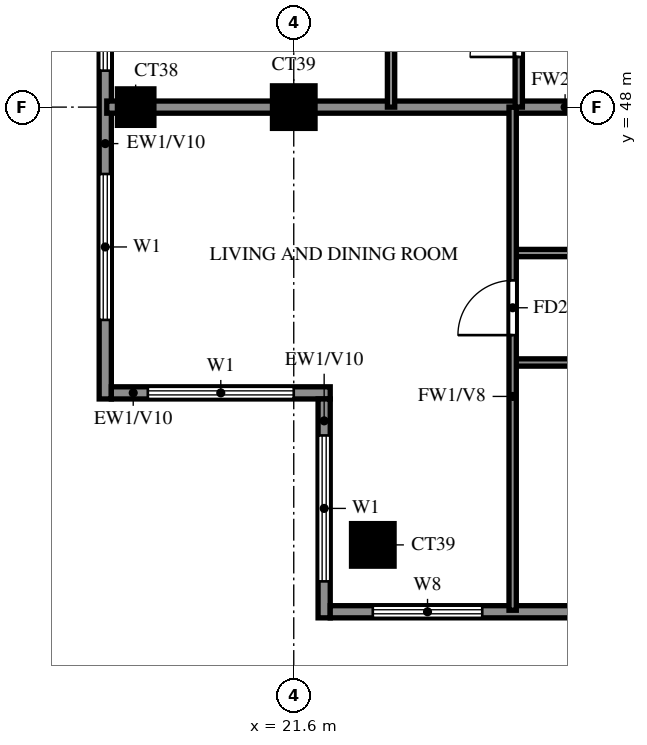
"""IFC4 building model, lengths in metres.
Left out: names, types, materials, properties, quantities, classifications, styles, units other than length and angle.
Written with IfcOpenShell. Run it as: python <this file> out.ifc"""

import sys

from ifc_helpers import new_model, si_unit, direction, frame, frame_2d, origin, origin_2d, place, context, subcontext, project, spatial, rectangle, extrude, source, transform, mapped, element, fill, save


model = new_model("IFC4")
c1 = context("Model", 3, precision=1e-05, world=origin(), true_north=direction((0.0, 1.0)))
c2 = subcontext(c1, "Body", "Model", "MODEL_VIEW")
j1 = project(units=[si_unit("LENGTHUNIT", "METRE"), si_unit("PLANEANGLEUNIT", "RADIAN")], contexts=[c1])
p1 = place(None, origin())
s1 = spatial("IfcSite", under=j1, at=p1, CompositionType="ELEMENT")
p2 = place(p1, origin())
s2 = spatial("IfcBuilding", under=s1, at=p2, CompositionType="ELEMENT")
p3 = place(p2, frame((0.0, 0.0, 267.5)))
s3 = spatial("IfcBuildingStorey", under=s2, at=p3, CompositionType="ELEMENT", Elevation=267.5)
m1 = source(origin(), c2, "Body", "SweptSolid", [
    extrude(rectangle(XDim=0.7, YDim=0.7, at=origin_2d()), origin(), (0.0, 0.0, 1.0), 3.099),
])
p4 = place(p3, frame((22.9, 40.8, 0.0), z_axis=(0.0, 0.0, 1.0), x_axis=(1.0, 0.0, 0.0)))
e1 = element("IfcColumn", 1, at=p4, inside=s3, PredefinedType="COLUMN", context=c2, shape_type="MappedRepresentation", body=[
    mapped(m1, transform((0.0, 0.0, 0.0))),
])
m2 = source(origin(), c2, "Body", "SweptSolid", [
    extrude(rectangle(XDim=0.6, YDim=0.6, at=origin_2d()), origin(), (0.0, 0.0, 1.0), 3.099),
])
p5 = place(p3, frame((19.0, 48.0, 0.0), z_axis=(0.0, 0.0, 1.0), x_axis=(1.0, 0.0, 0.0)))
e2 = element("IfcColumn", 2, at=p5, inside=s3, PredefinedType="COLUMN", context=c2, shape_type="MappedRepresentation", body=[
    mapped(m2, transform((0.0, 0.0, 0.0))),
])
p6 = place(p3, frame((21.6, 48.0, 0.0), z_axis=(0.0, 0.0, 1.0), x_axis=(1.0, 0.0, 0.0)))
e3 = element("IfcColumn", 3, at=p6, inside=s3, PredefinedType="COLUMN", context=c2, shape_type="MappedRepresentation", body=[
    mapped(m1, transform((0.0, 0.0, 0.0))),
])
p7 = place(p3, frame((18.5, 55.2, 0.0), z_axis=(0.0, 0.0, 1.0), x_axis=(0.0, -1.0, 0.0)))
e4 = element("IfcWall", 4, at=p7, inside=s3, PredefinedType="SOLIDWALL", context=c2, shape_type="SweptSolid", body=[
    extrude(rectangle(XDim=12.0, YDim=0.2, at=frame_2d((6.0, 0.0))), origin(), (0.0, 0.0, 1.0), 3.099),
])
p8 = place(p7, frame((8.3, 0.0, 0.6)))
e5 = element("IfcOpeningElement", 5, at=p8, cuts=e4, PredefinedType="OPENING", context=c2, shape_type="SweptSolid", body=[
    extrude(rectangle(XDim=2.4, YDim=2.4, at=frame_2d((1.2, 1.2))), frame((0.0, 0.11, 0.0), z_axis=(0.0, -1.0, 0.0), x_axis=(1.0, 0.0, 0.0)), (0.0, 0.0, 1.0), 0.22),
])
p9 = place(p7, frame((4.2, 0.0, 0.6)))
e6 = element("IfcOpeningElement", 6, at=p9, cuts=e4, PredefinedType="OPENING", context=c2, shape_type="SweptSolid", body=[
    extrude(rectangle(XDim=2.4, YDim=2.4, at=frame_2d((1.2, 1.2))), frame((0.0, 0.11, 0.0), z_axis=(0.0, -1.0, 0.0), x_axis=(1.0, 0.0, 0.0)), (0.0, 0.0, 1.0), 0.22),
])
p10 = place(p7, frame((0.7, 0.0, 0.6)))
e7 = element("IfcOpeningElement", 7, at=p10, cuts=e4, PredefinedType="OPENING", context=c2, shape_type="SweptSolid", body=[
    extrude(rectangle(XDim=2.4, YDim=2.4, at=frame_2d((1.2, 1.2))), frame((0.0, 0.11, 0.0), z_axis=(0.0, -1.0, 0.0), x_axis=(1.0, 0.0, 0.0)), (0.0, 0.0, 1.0), 0.22),
])
p11 = place(p3, frame((18.6, 43.3, 0.0), z_axis=(0.0, 0.0, 1.0), x_axis=(1.0, 0.0, 0.0)))
e8 = element("IfcWall", 8, at=p11, inside=s3, PredefinedType="SOLIDWALL", context=c2, shape_type="SweptSolid", body=[
    extrude(rectangle(XDim=3.6, YDim=0.2, at=frame_2d((1.8, 0.0))), origin(), (0.0, 0.0, 1.0), 3.099),
])
p12 = place(p11, frame((0.6, 0.0, 0.6)))
e9 = element("IfcOpeningElement", 9, at=p12, cuts=e8, PredefinedType="OPENING", context=c2, shape_type="SweptSolid", body=[
    extrude(rectangle(XDim=2.4, YDim=2.4, at=frame_2d((1.2, 1.2))), frame((0.0, 0.11, 0.0), z_axis=(0.0, -1.0, 0.0), x_axis=(1.0, 0.0, 0.0)), (0.0, 0.0, 1.0), 0.22),
])
p13 = place(p3, frame((22.1, 43.2, 0.0), z_axis=(0.0, 0.0, 1.0), x_axis=(0.0, -1.0, 0.0)))
e10 = element("IfcWall", 10, at=p13, inside=s3, PredefinedType="SOLIDWALL", context=c2, shape_type="SweptSolid", body=[
    extrude(rectangle(XDim=3.6, YDim=0.2, at=frame_2d((1.8, 0.0))), origin(), (0.0, 0.0, 1.0), 3.099),
])
p14 = place(p13, frame((0.6, 0.0, 0.6)))
e11 = element("IfcOpeningElement", 11, at=p14, cuts=e10, PredefinedType="OPENING", context=c2, shape_type="SweptSolid", body=[
    extrude(rectangle(XDim=2.4, YDim=2.4, at=frame_2d((1.2, 1.2))), frame((0.0, 0.11, 0.0), z_axis=(0.0, -1.0, 0.0), x_axis=(1.0, 0.0, 0.0)), (0.0, 0.0, 1.0), 0.22),
])
p15 = place(p3, frame((22.2, 39.7, 0.0), z_axis=(0.0, 0.0, 1.0), x_axis=(1.0, 0.0, 0.0)))
e12 = element("IfcWall", 12, at=p15, inside=s3, PredefinedType="SOLIDWALL", context=c2, shape_type="SweptSolid", body=[
    extrude(rectangle(XDim=19.8, YDim=0.2, at=frame_2d((9.9, 0.0))), origin(), (0.0, 0.0, 1.0), 3.099),
])
p16 = place(p15, frame((0.7, 0.0, 0.6)))
e13 = element("IfcOpeningElement", 13, at=p16, cuts=e12, PredefinedType="OPENING", context=c2, shape_type="SweptSolid", body=[
    extrude(rectangle(XDim=1.8, YDim=2.4, at=frame_2d((0.9, 1.2))), frame((0.0, 0.11, 0.0), z_axis=(0.0, -1.0, 0.0), x_axis=(1.0, 0.0, 0.0)), (0.0, 0.0, 1.0), 0.22),
])
p17 = place(p15, frame((4.35, 0.0, 1.5)))
e14 = element("IfcOpeningElement", 14, at=p17, cuts=e12, PredefinedType="OPENING", context=c2, shape_type="SweptSolid", body=[
    extrude(rectangle(XDim=0.9, YDim=0.9, at=frame_2d((0.45, 0.45))), frame((0.0, 0.11, 0.0), z_axis=(0.0, -1.0, 0.0), x_axis=(1.0, 0.0, 0.0)), (0.0, 0.0, 1.0), 0.22),
])
p18 = place(p15, frame((7.8, 0.0, 0.6)))
e15 = element("IfcOpeningElement", 15, at=p18, cuts=e12, PredefinedType="OPENING", context=c2, shape_type="SweptSolid", body=[
    extrude(rectangle(XDim=2.4, YDim=2.4, at=frame_2d((1.2, 1.2))), frame((0.0, 0.11, 0.0), z_axis=(0.0, -1.0, 0.0), x_axis=(1.0, 0.0, 0.0)), (0.0, 0.0, 1.0), 0.22),
])
p19 = place(p3, frame((18.525, 48.0, 0.0), z_axis=(0.0, 0.0, 1.0), x_axis=(1.0, 0.0, 0.0)))
e16 = element("IfcWall", 16, at=p19, inside=s3, PredefinedType="SOLIDWALL", context=c2, shape_type="SweptSolid", body=[
    extrude(rectangle(XDim=15.075, YDim=0.2, at=frame_2d((7.538, 0.0))), origin(), (0.0, 0.0, 1.0), 3.099),
])
p20 = place(p3, frame((25.2, 43.8, 0.0), z_axis=(0.0, 0.0, 1.0), x_axis=(1.0, 0.0, 0.0)))
e17 = element("IfcWall", 17, at=p20, inside=s3, PredefinedType="PARTITIONING", context=c2, shape_type="SweptSolid", body=[
    extrude(rectangle(XDim=8.4, YDim=0.12, at=frame_2d((4.2, 0.0))), origin(), (0.0, 0.0, 1.0), 3.099),
])
p21 = place(p20, frame((1.35, 0.0, 0.0)))
e18 = element("IfcOpeningElement", 18, at=p21, cuts=e17, PredefinedType="OPENING", context=c2, shape_type="SweptSolid", body=[
    extrude(rectangle(XDim=0.9, YDim=2.1, at=frame_2d((0.45, 1.05))), frame((0.0, 0.07, 0.0), z_axis=(0.0, -1.0, 0.0), x_axis=(1.0, 0.0, 0.0)), (0.0, 0.0, 1.0), 0.14),
])
p22 = place(p20, frame((5.55, 0.0, 0.0)))
e19 = element("IfcOpeningElement", 19, at=p22, cuts=e17, PredefinedType="OPENING", context=c2, shape_type="SweptSolid", body=[
    extrude(rectangle(XDim=0.9, YDim=2.1, at=frame_2d((0.45, 1.05))), frame((0.0, 0.07, 0.0), z_axis=(0.0, -1.0, 0.0), x_axis=(1.0, 0.0, 0.0)), (0.0, 0.0, 1.0), 0.14),
])
p23 = place(p3, frame((25.2, 45.6, 0.0), z_axis=(0.0, 0.0, 1.0), x_axis=(1.0, 0.0, 0.0)))
e20 = element("IfcWall", 20, at=p23, inside=s3, PredefinedType="PARTITIONING", context=c2, shape_type="SweptSolid", body=[
    extrude(rectangle(XDim=6.0, YDim=0.12, at=frame_2d((3.0, 0.0))), origin(), (0.0, 0.0, 1.0), 3.099),
])
p24 = place(p23, frame((2.55, 0.0, 0.0)))
e21 = element("IfcOpeningElement", 21, at=p24, cuts=e20, PredefinedType="OPENING", context=c2, shape_type="SweptSolid", body=[
    extrude(rectangle(XDim=0.9, YDim=2.1, at=frame_2d((0.45, 1.05))), frame((0.0, 0.07, 0.0), z_axis=(0.0, -1.0, 0.0), x_axis=(1.0, 0.0, 0.0)), (0.0, 0.0, 1.0), 0.14),
])
p25 = place(p3, frame((23.2, 48.0, 0.0), z_axis=(0.0, 0.0, 1.0), x_axis=(0.0, 1.0, 0.0)))
e22 = element("IfcWall", 22, at=p25, inside=s3, PredefinedType="PARTITIONING", context=c2, shape_type="SweptSolid", body=[
    extrude(rectangle(XDim=21.6, YDim=0.12, at=frame_2d((10.8, 0.0))), origin(), (0.0, 0.0, 1.0), 3.099),
])
p26 = place(p25, frame((1.35, 0.0, 0.0)))
e23 = element("IfcOpeningElement", 23, at=p26, cuts=e22, PredefinedType="OPENING", context=c2, shape_type="SweptSolid", body=[
    extrude(rectangle(XDim=0.9, YDim=2.1, at=frame_2d((0.45, 1.05))), frame((0.0, 0.07, 0.0), z_axis=(0.0, -1.0, 0.0), x_axis=(1.0, 0.0, 0.0)), (0.0, 0.0, 1.0), 0.14),
])
p27 = place(p25, frame((7.95, 0.0, 0.0)))
e24 = element("IfcOpeningElement", 24, at=p27, cuts=e22, PredefinedType="OPENING", context=c2, shape_type="SweptSolid", body=[
    extrude(rectangle(XDim=1.5, YDim=2.1, at=frame_2d((0.75, 1.05))), frame((0.0, 0.07, 0.0), z_axis=(0.0, -1.0, 0.0), x_axis=(1.0, 0.0, 0.0)), (0.0, 0.0, 1.0), 0.14),
])
p28 = place(p25, frame((12.15, 0.0, 0.0)))
e25 = element("IfcOpeningElement", 25, at=p28, cuts=e22, PredefinedType="OPENING", context=c2, shape_type="SweptSolid", body=[
    extrude(rectangle(XDim=0.9, YDim=2.1, at=frame_2d((0.45, 1.05))), frame((0.0, 0.07, 0.0), z_axis=(0.0, -1.0, 0.0), x_axis=(1.0, 0.0, 0.0)), (0.0, 0.0, 1.0), 0.14),
])
p29 = place(p25, frame((15.75, 0.0, 0.0)))
e26 = element("IfcOpeningElement", 26, at=p29, cuts=e22, PredefinedType="OPENING", context=c2, shape_type="SweptSolid", body=[
    extrude(rectangle(XDim=0.9, YDim=2.1, at=frame_2d((0.45, 1.05))), frame((0.0, 0.07, 0.0), z_axis=(0.0, -1.0, 0.0), x_axis=(1.0, 0.0, 0.0)), (0.0, 0.0, 1.0), 0.14),
])
p30 = place(p25, frame((19.35, 0.0, 0.0)))
e27 = element("IfcOpeningElement", 27, at=p30, cuts=e22, PredefinedType="OPENING", context=c2, shape_type="SweptSolid", body=[
    extrude(rectangle(XDim=0.9, YDim=2.1, at=frame_2d((0.45, 1.05))), frame((0.0, 0.07, 0.0), z_axis=(0.0, -1.0, 0.0), x_axis=(1.0, 0.0, 0.0)), (0.0, 0.0, 1.0), 0.14),
])
p31 = place(p3, frame((25.2, 39.725, 0.0), z_axis=(0.0, 0.0, 1.0), x_axis=(0.0, 1.0, 0.0)))
e28 = element("IfcWall", 28, at=p31, inside=s3, PredefinedType="PARTITIONING", context=c2, shape_type="SweptSolid", body=[
    extrude(rectangle(XDim=8.275, YDim=0.12, at=frame_2d((4.137, 0.0))), origin(), (0.0, 0.0, 1.0), 3.099),
])
p32 = place(p31, frame((4.525, 0.0, 0.0)))
e29 = element("IfcOpeningElement", 29, at=p32, cuts=e28, PredefinedType="OPENING", context=c2, shape_type="SweptSolid", body=[
    extrude(rectangle(XDim=0.9, YDim=2.1, at=frame_2d((0.45, 1.05))), frame((0.0, 0.07, 0.0), z_axis=(0.0, -1.0, 0.0), x_axis=(1.0, 0.0, 0.0)), (0.0, 0.0, 1.0), 0.14),
])
p33 = place(p3, frame((25.3, 48.0, 0.0), z_axis=(0.0, 0.0, 1.0), x_axis=(0.0, 1.0, 0.0)))
e30 = element("IfcWall", 30, at=p33, inside=s3, PredefinedType="PARTITIONING", context=c2, shape_type="SweptSolid", body=[
    extrude(rectangle(XDim=5.2, YDim=0.12, at=frame_2d((2.6, 0.0))), origin(), (0.0, 0.0, 1.0), 3.099),
])
p34 = place(p33, frame((0.825, 0.0, 0.0)))
e31 = element("IfcOpeningElement", 31, at=p34, cuts=e30, PredefinedType="OPENING", context=c2, shape_type="SweptSolid", body=[
    extrude(rectangle(XDim=0.8, YDim=2.1, at=frame_2d((0.4, 1.05))), frame((0.0, 0.07, 0.0), z_axis=(0.0, -1.0, 0.0), x_axis=(1.0, 0.0, 0.0)), (0.0, 0.0, 1.0), 0.14),
])
p35 = place(p8, origin())
e32 = element("IfcWindow", 32, at=p35, inside=s3, PartitioningType="DOUBLE_PANEL_VERTICAL", PredefinedType="WINDOW", context=c2, shape_type="SweptSolid", body=[
    extrude(rectangle(XDim=2.4, YDim=2.4, at=frame_2d((1.2, 1.2))), frame((0.0, 0.03, 0.0), z_axis=(0.0, -1.0, 0.0), x_axis=(1.0, 0.0, 0.0)), (0.0, 0.0, 1.0), 0.06),
])
fill(e5, e32)
p36 = place(p9, origin())
e33 = element("IfcWindow", 33, at=p36, inside=s3, PartitioningType="DOUBLE_PANEL_VERTICAL", PredefinedType="WINDOW", context=c2, shape_type="SweptSolid", body=[
    extrude(rectangle(XDim=2.4, YDim=2.4, at=frame_2d((1.2, 1.2))), frame((0.0, 0.03, 0.0), z_axis=(0.0, -1.0, 0.0), x_axis=(1.0, 0.0, 0.0)), (0.0, 0.0, 1.0), 0.06),
])
fill(e6, e33)
p37 = place(p12, origin())
e34 = element("IfcWindow", 34, at=p37, inside=s3, PartitioningType="DOUBLE_PANEL_VERTICAL", PredefinedType="WINDOW", context=c2, shape_type="SweptSolid", body=[
    extrude(rectangle(XDim=2.4, YDim=2.4, at=frame_2d((1.2, 1.2))), frame((0.0, 0.03, 0.0), z_axis=(0.0, -1.0, 0.0), x_axis=(1.0, 0.0, 0.0)), (0.0, 0.0, 1.0), 0.06),
])
fill(e9, e34)
p38 = place(p14, origin())
e35 = element("IfcWindow", 35, at=p38, inside=s3, PartitioningType="DOUBLE_PANEL_VERTICAL", PredefinedType="WINDOW", context=c2, shape_type="SweptSolid", body=[
    extrude(rectangle(XDim=2.4, YDim=2.4, at=frame_2d((1.2, 1.2))), frame((0.0, 0.03, 0.0), z_axis=(0.0, -1.0, 0.0), x_axis=(1.0, 0.0, 0.0)), (0.0, 0.0, 1.0), 0.06),
])
fill(e11, e35)
p39 = place(p16, origin())
e36 = element("IfcWindow", 36, at=p39, inside=s3, PartitioningType="DOUBLE_PANEL_VERTICAL", PredefinedType="WINDOW", context=c2, shape_type="SweptSolid", body=[
    extrude(rectangle(XDim=1.8, YDim=2.4, at=frame_2d((0.9, 1.2))), frame((0.0, 0.03, 0.0), z_axis=(0.0, -1.0, 0.0), x_axis=(1.0, 0.0, 0.0)), (0.0, 0.0, 1.0), 0.06),
])
fill(e13, e36)
p40 = place(p32, origin())
e37 = element("IfcDoor", 37, at=p40, inside=s3, OperationType="SINGLE_SWING_LEFT", PredefinedType="DOOR", context=c2, shape_type="SweptSolid", body=[
    extrude(rectangle(XDim=0.9, YDim=2.1, at=frame_2d((0.45, 1.05))), frame((0.0, 0.025, 0.0), z_axis=(0.0, -1.0, 0.0), x_axis=(1.0, 0.0, 0.0)), (0.0, 0.0, 1.0), 0.05),
])
fill(e29, e37)
p41 = place(p34, origin())
e38 = element("IfcDoor", 38, at=p41, inside=s3, OperationType="SINGLE_SWING_LEFT", PredefinedType="DOOR", context=c2, shape_type="SweptSolid", body=[
    extrude(rectangle(XDim=0.8, YDim=2.1, at=frame_2d((0.4, 1.05))), frame((0.0, 0.025, 0.0), z_axis=(0.0, -1.0, 0.0), x_axis=(1.0, 0.0, 0.0)), (0.0, 0.0, 1.0), 0.05),
])
fill(e31, e38)
save(model, sys.argv[1])
